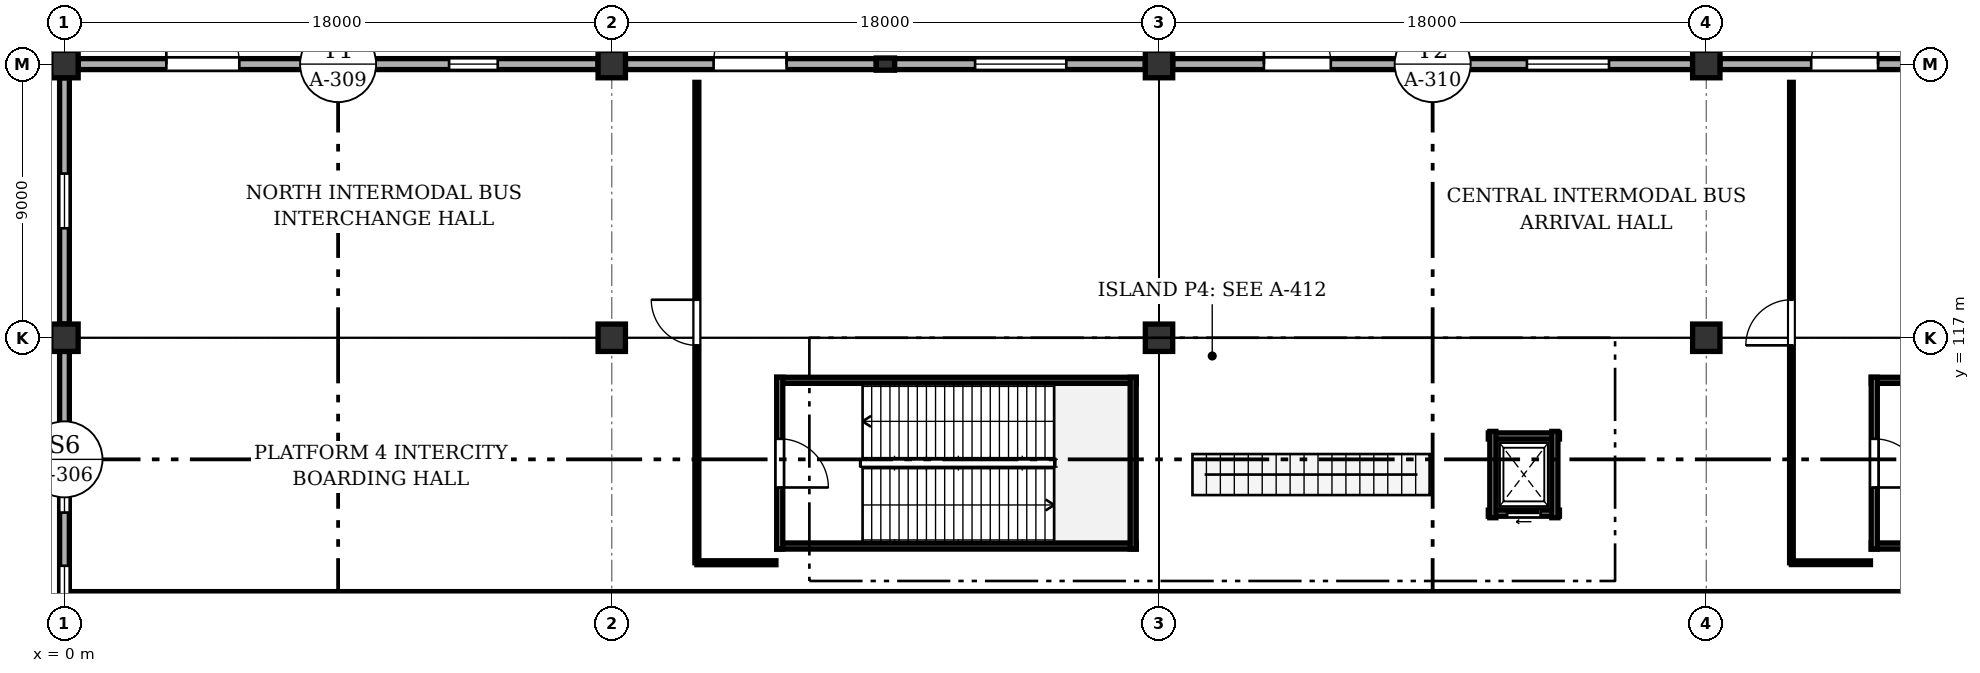
"""IFC4 building model, lengths in metres.
Left out: names, types, materials, properties, quantities, classifications, styles, units other than length and angle.
Written with IfcOpenShell. Run it as: python <this file> out.ifc"""

import sys

from ifc_helpers import new_model, si_unit, direction, frame, frame_2d, origin, origin_2d, place, context, subcontext, project, spatial, rectangle, i_section, extrude, element, fill, save


model = new_model("IFC4")
c1 = context("Model", 3, precision=1e-05, world=origin(), true_north=direction((0.0, 1.0)))
c2 = subcontext(c1, "Body", "Model", "MODEL_VIEW")
j1 = project(units=[si_unit("LENGTHUNIT", "METRE"), si_unit("PLANEANGLEUNIT", "RADIAN")], contexts=[c1])
p1 = place(None, origin())
s1 = spatial("IfcSite", under=j1, at=p1, CompositionType="ELEMENT")
p2 = place(p1, origin())
s2 = spatial("IfcBuilding", under=s1, at=p2, CompositionType="ELEMENT")
p3 = place(p2, origin())
s3 = spatial("IfcBuildingStorey", under=s2, at=p3, CompositionType="ELEMENT", Elevation=0.0)
for number, where, z_axis, x_axis in (
    (1, (0.0, 117.0, 0.0), (0.0, 0.0, 1.0), (1.0, 0.0, 0.0)),
    (2, (0.0, 126.0, 0.0), (0.0, 0.0, 1.0), (1.0, 0.0, 0.0)),
    (3, (18.0, 117.0, 0.0), (0.0, 0.0, 1.0), (1.0, 0.0, 0.0)),
    (4, (18.0, 126.0, 0.0), (0.0, 0.0, 1.0), (1.0, 0.0, 0.0)),
    (5, (36.0, 117.0, 0.0), (0.0, 0.0, 1.0), (1.0, 0.0, 0.0)),
    (6, (36.0, 126.0, 0.0), (0.0, 0.0, 1.0), (1.0, 0.0, 0.0)),
    (7, (54.0, 117.0, 0.0), (0.0, 0.0, 1.0), (1.0, 0.0, 0.0)),
    (8, (54.0, 126.0, 0.0), (0.0, 0.0, 1.0), (1.0, 0.0, 0.0)),
):
    element("IfcColumn", number, at=place(p3, frame(where, z_axis=z_axis, x_axis=x_axis)), inside=s3, PredefinedType="COLUMN", context=c2, shape_type="SweptSolid", body=[
        extrude(rectangle(XDim=0.9, YDim=0.9, at=origin_2d()), origin(), (0.0, 0.0, 1.0), 6.6),
    ])
p4 = place(p3, frame((9.0, 126.0, 0.0), z_axis=(0.0, 0.0, 1.0), x_axis=(1.0, 0.0, 0.0)))
e9 = element("IfcColumn", 9, at=p4, inside=s3, PredefinedType="PILASTER", context=c2, shape_type="SweptSolid", body=[
    extrude(i_section(OverallWidth=0.2, OverallDepth=0.2, WebThickness=0.008, FlangeThickness=0.012, FilletRadius=0.013, at=origin_2d()), origin(), (0.0, 0.0, 1.0), 6.28),
])
p5 = place(p3, frame((27.0, 126.0, 0.0), z_axis=(0.0, 0.0, 1.0), x_axis=(1.0, 0.0, 0.0)))
e10 = element("IfcColumn", 10, at=p5, inside=s3, PredefinedType="PILASTER", context=c2, shape_type="SweptSolid", body=[
    extrude(rectangle(XDim=0.6, YDim=0.4, at=origin_2d()), origin(), (0.0, 0.0, 1.0), 6.28),
])
p6 = place(p3, frame((45.0, 126.0, 0.0), z_axis=(0.0, 0.0, 1.0), x_axis=(1.0, 0.0, 0.0)))
e11 = element("IfcColumn", 11, at=p6, inside=s3, PredefinedType="PILASTER", context=c2, shape_type="SweptSolid", body=[
    extrude(i_section(OverallWidth=0.25, OverallDepth=0.25, WebThickness=0.009, FlangeThickness=0.014, FilletRadius=0.016, at=origin_2d()), origin(), (0.0, 0.0, 1.0), 6.28),
])
p7 = place(p3, frame((0.15, 108.5, -1.25), z_axis=(0.0, 0.0, 1.0), x_axis=(1.0, 0.0, 0.0)))
e12 = element("IfcWall", 12, at=p7, inside=s3, PredefinedType="SOLIDWALL", context=c2, shape_type="SweptSolid", body=[
    extrude(rectangle(XDim=107.7, YDim=0.3, at=frame_2d((53.85, 0.0))), origin(), (0.0, 0.0, 1.0), 0.87),
])
p8 = place(p3, frame((0.0, 104.1, 0.0), z_axis=(0.0, 0.0, 1.0), x_axis=(0.0, 1.0, 0.0)))
e13 = element("IfcWall", 13, at=p8, inside=s3, PredefinedType="SOLIDWALL", context=c2, shape_type="SweptSolid", body=[
    extrude(rectangle(XDim=12.45, YDim=0.32, at=frame_2d((6.225, 0.0))), origin(), (0.0, 0.0, 1.0), 5.495),
])
p9 = place(p8, frame((3.0, 0.0, 0.95)))
e14 = element("IfcOpeningElement", 14, at=p9, cuts=e13, PredefinedType="OPENING", context=c2, shape_type="SweptSolid", body=[
    extrude(rectangle(XDim=2.4, YDim=2.1, at=frame_2d((1.2, 1.05))), frame((0.0, 0.17, 0.0), z_axis=(0.0, -1.0, 0.0), x_axis=(1.0, 0.0, 0.0)), (0.0, 0.0, 1.0), 0.34),
])
p10 = place(p8, frame((7.15, 0.0, 0.95)))
e15 = element("IfcOpeningElement", 15, at=p10, cuts=e13, PredefinedType="OPENING", context=c2, shape_type="SweptSolid", body=[
    extrude(rectangle(XDim=2.1, YDim=2.0, at=frame_2d((1.05, 1.0))), frame((0.0, 0.17, 0.0), z_axis=(0.0, -1.0, 0.0), x_axis=(1.0, 0.0, 0.0)), (0.0, 0.0, 1.0), 0.34),
])
p11 = place(p3, frame((0.0, 117.45, 0.0), z_axis=(0.0, 0.0, 1.0), x_axis=(0.0, 1.0, 0.0)))
e16 = element("IfcWall", 16, at=p11, inside=s3, PredefinedType="SOLIDWALL", context=c2, shape_type="SweptSolid", body=[
    extrude(rectangle(XDim=8.1, YDim=0.32, at=frame_2d((4.05, 0.0))), origin(), (0.0, 0.0, 1.0), 5.67),
])
p12 = place(p11, frame((3.15, 0.0, 0.95)))
e17 = element("IfcOpeningElement", 17, at=p12, cuts=e16, PredefinedType="OPENING", context=c2, shape_type="SweptSolid", body=[
    extrude(rectangle(XDim=1.8, YDim=2.0, at=frame_2d((0.9, 1.0))), frame((0.0, 0.17, 0.0), z_axis=(0.0, -1.0, 0.0), x_axis=(1.0, 0.0, 0.0)), (0.0, 0.0, 1.0), 0.34),
])
p13 = place(p3, frame((0.45, 126.0, 0.0), z_axis=(0.0, 0.0, 1.0), x_axis=(1.0, 0.0, 0.0)))
e18 = element("IfcWall", 18, at=p13, inside=s3, PredefinedType="SOLIDWALL", context=c2, shape_type="SweptSolid", body=[
    extrude(rectangle(XDim=8.546, YDim=0.36, at=frame_2d((4.273, 0.0))), origin(), (0.0, 0.0, 1.0), 5.79),
])
p14 = place(p13, frame((2.9, 0.0, 0.0)))
e19 = element("IfcOpeningElement", 19, at=p14, cuts=e18, PredefinedType="OPENING", context=c2, shape_type="SweptSolid", body=[
    extrude(rectangle(XDim=2.4, YDim=2.5, at=frame_2d((1.2, 1.25))), frame((0.0, 0.19, 0.0), z_axis=(0.0, -1.0, 0.0), x_axis=(1.0, 0.0, 0.0)), (0.0, 0.0, 1.0), 0.38),
])
p15 = place(p3, frame((9.004, 126.0, 0.0), z_axis=(0.0, 0.0, 1.0), x_axis=(1.0, 0.0, 0.0)))
e20 = element("IfcWall", 20, at=p15, inside=s3, PredefinedType="SOLIDWALL", context=c2, shape_type="SweptSolid", body=[
    extrude(rectangle(XDim=8.546, YDim=0.36, at=frame_2d((4.273, 0.0))), origin(), (0.0, 0.0, 1.0), 5.79),
])
p16 = place(p15, frame((3.646, 0.0, 0.95)))
e21 = element("IfcOpeningElement", 21, at=p16, cuts=e20, PredefinedType="OPENING", context=c2, shape_type="SweptSolid", body=[
    extrude(rectangle(XDim=1.6, YDim=1.9, at=frame_2d((0.8, 0.95))), frame((0.0, 0.19, 0.0), z_axis=(0.0, -1.0, 0.0), x_axis=(1.0, 0.0, 0.0)), (0.0, 0.0, 1.0), 0.38),
])
p17 = place(p3, frame((18.45, 126.0, 0.0), z_axis=(0.0, 0.0, 1.0), x_axis=(1.0, 0.0, 0.0)))
e22 = element("IfcWall", 22, at=p17, inside=s3, PredefinedType="SOLIDWALL", context=c2, shape_type="SweptSolid", body=[
    extrude(rectangle(XDim=8.25, YDim=0.36, at=frame_2d((4.125, 0.0))), origin(), (0.0, 0.0, 1.0), 5.79),
])
p18 = place(p17, frame((2.9, 0.0, 0.0)))
e23 = element("IfcOpeningElement", 23, at=p18, cuts=e22, PredefinedType="OPENING", context=c2, shape_type="SweptSolid", body=[
    extrude(rectangle(XDim=2.4, YDim=2.5, at=frame_2d((1.2, 1.25))), frame((0.0, 0.19, 0.0), z_axis=(0.0, -1.0, 0.0), x_axis=(1.0, 0.0, 0.0)), (0.0, 0.0, 1.0), 0.38),
])
p19 = place(p3, frame((27.3, 126.0, 0.0), z_axis=(0.0, 0.0, 1.0), x_axis=(1.0, 0.0, 0.0)))
e24 = element("IfcWall", 24, at=p19, inside=s3, PredefinedType="SOLIDWALL", context=c2, shape_type="SweptSolid", body=[
    extrude(rectangle(XDim=8.25, YDim=0.36, at=frame_2d((4.125, 0.0))), origin(), (0.0, 0.0, 1.0), 5.79),
])
p20 = place(p19, frame((2.65, 0.0, 0.95)))
e25 = element("IfcOpeningElement", 25, at=p20, cuts=e24, PredefinedType="OPENING", context=c2, shape_type="SweptSolid", body=[
    extrude(rectangle(XDim=3.0, YDim=2.1, at=frame_2d((1.5, 1.05))), frame((0.0, 0.19, 0.0), z_axis=(0.0, -1.0, 0.0), x_axis=(1.0, 0.0, 0.0)), (0.0, 0.0, 1.0), 0.38),
])
p21 = place(p3, frame((36.45, 126.0, 0.0), z_axis=(0.0, 0.0, 1.0), x_axis=(1.0, 0.0, 0.0)))
e26 = element("IfcWall", 26, at=p21, inside=s3, PredefinedType="SOLIDWALL", context=c2, shape_type="SweptSolid", body=[
    extrude(rectangle(XDim=8.546, YDim=0.36, at=frame_2d((4.273, 0.0))), origin(), (0.0, 0.0, 1.0), 5.79),
])
p22 = place(p21, frame((3.0, 0.0, 0.0)))
e27 = element("IfcOpeningElement", 27, at=p22, cuts=e26, PredefinedType="OPENING", context=c2, shape_type="SweptSolid", body=[
    extrude(rectangle(XDim=2.2, YDim=2.45, at=frame_2d((1.1, 1.225))), frame((0.0, 0.19, 0.0), z_axis=(0.0, -1.0, 0.0), x_axis=(1.0, 0.0, 0.0)), (0.0, 0.0, 1.0), 0.38),
])
p23 = place(p3, frame((45.004, 126.0, 0.0), z_axis=(0.0, 0.0, 1.0), x_axis=(1.0, 0.0, 0.0)))
e28 = element("IfcWall", 28, at=p23, inside=s3, PredefinedType="SOLIDWALL", context=c2, shape_type="SweptSolid", body=[
    extrude(rectangle(XDim=8.546, YDim=0.36, at=frame_2d((4.273, 0.0))), origin(), (0.0, 0.0, 1.0), 5.79),
])
p24 = place(p23, frame((3.095, 0.0, 0.95)))
e29 = element("IfcOpeningElement", 29, at=p24, cuts=e28, PredefinedType="OPENING", context=c2, shape_type="SweptSolid", body=[
    extrude(rectangle(XDim=2.7, YDim=2.1, at=frame_2d((1.35, 1.05))), frame((0.0, 0.19, 0.0), z_axis=(0.0, -1.0, 0.0), x_axis=(1.0, 0.0, 0.0)), (0.0, 0.0, 1.0), 0.38),
])
p25 = place(p3, frame((54.45, 126.0, 0.0), z_axis=(0.0, 0.0, 1.0), x_axis=(1.0, 0.0, 0.0)))
e30 = element("IfcWall", 30, at=p25, inside=s3, PredefinedType="SOLIDWALL", context=c2, shape_type="SweptSolid", body=[
    extrude(rectangle(XDim=8.25, YDim=0.36, at=frame_2d((4.125, 0.0))), origin(), (0.0, 0.0, 1.0), 5.79),
])
p26 = place(p25, frame((3.0, 0.0, 0.0)))
e31 = element("IfcOpeningElement", 31, at=p26, cuts=e30, PredefinedType="OPENING", context=c2, shape_type="SweptSolid", body=[
    extrude(rectangle(XDim=2.2, YDim=2.45, at=frame_2d((1.1, 1.225))), frame((0.0, 0.19, 0.0), z_axis=(0.0, -1.0, 0.0), x_axis=(1.0, 0.0, 0.0)), (0.0, 0.0, 1.0), 0.38),
])
for number, where, z_axis, x_axis in (
    (32, (23.425, 110.15, 0.0), (0.0, 0.0, 1.0), (1.0, 0.0, 0.0)),
    (33, (35.25, 115.6, 0.0), (0.0, 0.0, 1.0), (-1.0, 0.0, 0.0)),
):
    element("IfcWall", number, at=place(p3, frame(where, z_axis=z_axis, x_axis=x_axis)), inside=s3, PredefinedType="SOLIDWALL", context=c2, shape_type="SweptSolid", body=[
        extrude(rectangle(XDim=11.825, YDim=0.2, at=frame_2d((5.913, 0.0))), origin(), (0.0, 0.0, 1.0), 6.32),
    ])
p27 = place(p3, frame((35.15, 110.05, 0.0), z_axis=(0.0, 0.0, 1.0), x_axis=(0.0, 1.0, 0.0)))
e34 = element("IfcWall", 34, at=p27, inside=s3, PredefinedType="SOLIDWALL", context=c2, shape_type="SweptSolid", body=[
    extrude(rectangle(XDim=5.65, YDim=0.2, at=frame_2d((2.825, 0.0))), origin(), (0.0, 0.0, 1.0), 6.32),
])
p28 = place(p3, frame((23.525, 115.7, 0.0), z_axis=(0.0, 0.0, 1.0), x_axis=(0.0, -1.0, 0.0)))
e35 = element("IfcWall", 35, at=p28, inside=s3, PredefinedType="SOLIDWALL", context=c2, shape_type="SweptSolid", body=[
    extrude(rectangle(XDim=5.65, YDim=0.2, at=frame_2d((2.825, 0.0))), origin(), (0.0, 0.0, 1.0), 4.4),
])
p29 = place(p28, frame((2.025, 0.0, 0.0)))
e36 = element("IfcOpeningElement", 36, at=p29, cuts=e35, PredefinedType="OPENING", context=c2, shape_type="SweptSolid", body=[
    extrude(rectangle(XDim=1.6, YDim=2.15, at=frame_2d((0.8, 1.075))), frame((0.0, 0.11, 0.0), z_axis=(0.0, -1.0, 0.0), x_axis=(1.0, 0.0, 0.0)), (0.0, 0.0, 1.0), 0.22),
])
for number, where, z_axis, x_axis in (
    (37, (59.425, 110.15, 0.0), (0.0, 0.0, 1.0), (1.0, 0.0, 0.0)),
    (38, (71.25, 115.6, 0.0), (0.0, 0.0, 1.0), (-1.0, 0.0, 0.0)),
):
    element("IfcWall", number, at=place(p3, frame(where, z_axis=z_axis, x_axis=x_axis)), inside=s3, PredefinedType="SOLIDWALL", context=c2, shape_type="SweptSolid", body=[
        extrude(rectangle(XDim=11.825, YDim=0.2, at=frame_2d((5.913, 0.0))), origin(), (0.0, 0.0, 1.0), 6.32),
    ])
p30 = place(p3, frame((59.525, 115.7, 0.0), z_axis=(0.0, 0.0, 1.0), x_axis=(0.0, -1.0, 0.0)))
e39 = element("IfcWall", 39, at=p30, inside=s3, PredefinedType="SOLIDWALL", context=c2, shape_type="SweptSolid", body=[
    extrude(rectangle(XDim=5.65, YDim=0.2, at=frame_2d((2.825, 0.0))), origin(), (0.0, 0.0, 1.0), 4.4),
])
p31 = place(p30, frame((2.025, 0.0, 0.0)))
e40 = element("IfcOpeningElement", 40, at=p31, cuts=e39, PredefinedType="OPENING", context=c2, shape_type="SweptSolid", body=[
    extrude(rectangle(XDim=1.6, YDim=2.15, at=frame_2d((0.8, 1.075))), frame((0.0, 0.11, 0.0), z_axis=(0.0, -1.0, 0.0), x_axis=(1.0, 0.0, 0.0)), (0.0, 0.0, 1.0), 0.22),
])
p32 = place(p3, frame((46.83, 111.23, 0.0), z_axis=(0.0, 0.0, 1.0), x_axis=(1.0, 0.0, 0.0)))
e41 = element("IfcWall", 41, at=p32, inside=s3, PredefinedType="SOLIDWALL", context=c2, shape_type="SweptSolid", body=[
    extrude(rectangle(XDim=2.34, YDim=0.2, at=frame_2d((1.17, 0.0))), origin(), (0.0, 0.0, 1.0), 4.4),
])
p33 = place(p32, frame((0.62, 0.0, 0.0)))
e42 = element("IfcOpeningElement", 42, at=p33, cuts=e41, PredefinedType="OPENING", context=c2, shape_type="SweptSolid", body=[
    extrude(rectangle(XDim=1.1, YDim=2.15, at=frame_2d((0.55, 1.075))), frame((0.0, 0.11, 0.0), z_axis=(0.0, -1.0, 0.0), x_axis=(1.0, 0.0, 0.0)), (0.0, 0.0, 1.0), 0.22),
])
p34 = place(p3, frame((49.17, 113.77, 0.0), z_axis=(0.0, 0.0, 1.0), x_axis=(-1.0, 0.0, 0.0)))
e43 = element("IfcWall", 43, at=p34, inside=s3, PredefinedType="SOLIDWALL", context=c2, shape_type="SweptSolid", body=[
    extrude(rectangle(XDim=2.34, YDim=0.2, at=frame_2d((1.17, 0.0))), origin(), (0.0, 0.0, 1.0), 4.4),
])
for number, where, z_axis, x_axis in (
    (44, (46.98, 113.92, 0.0), (0.0, 0.0, 1.0), (0.0, -1.0, 0.0)),
    (45, (49.02, 111.08, 0.0), (0.0, 0.0, 1.0), (0.0, 1.0, 0.0)),
):
    element("IfcWall", number, at=place(p3, frame(where, z_axis=z_axis, x_axis=x_axis)), inside=s3, PredefinedType="SOLIDWALL", context=c2, shape_type="SweptSolid", body=[
        extrude(rectangle(XDim=2.84, YDim=0.2, at=frame_2d((1.42, 0.0))), origin(), (0.0, 0.0, 1.0), 4.4),
    ])
p35 = place(p3, frame((23.4, 109.6, 0.0), z_axis=(0.0, 0.0, 1.0), x_axis=(-1.0, 0.0, 0.0)))
e46 = element("IfcWall", 46, at=p35, inside=s3, PredefinedType="PARTITIONING", context=c2, shape_type="SweptSolid", body=[
    extrude(rectangle(XDim=2.6, YDim=0.13, at=frame_2d((1.3, 0.0))), origin(), (0.0, 0.0, 1.0), 4.4),
])
p36 = place(p3, frame((20.8, 109.6, 0.0), z_axis=(0.0, 0.0, 1.0), x_axis=(0.0, 1.0, 0.0)))
e47 = element("IfcWall", 47, at=p36, inside=s3, PredefinedType="PARTITIONING", context=c2, shape_type="SweptSolid", body=[
    extrude(rectangle(XDim=15.8, YDim=0.13, at=frame_2d((7.9, 0.0))), origin(), (0.0, 0.0, 1.0), 4.4),
])
p37 = place(p36, frame((7.15, 0.0, 0.0)))
e48 = element("IfcOpeningElement", 48, at=p37, cuts=e47, PredefinedType="OPENING", context=c2, shape_type="SweptSolid", body=[
    extrude(rectangle(XDim=1.5, YDim=2.15, at=frame_2d((0.75, 1.075))), frame((0.0, 0.075, 0.0), z_axis=(0.0, -1.0, 0.0), x_axis=(1.0, 0.0, 0.0)), (0.0, 0.0, 1.0), 0.15),
])
p38 = place(p3, frame((59.4, 109.6, 0.0), z_axis=(0.0, 0.0, 1.0), x_axis=(-1.0, 0.0, 0.0)))
e49 = element("IfcWall", 49, at=p38, inside=s3, PredefinedType="PARTITIONING", context=c2, shape_type="SweptSolid", body=[
    extrude(rectangle(XDim=2.6, YDim=0.12, at=frame_2d((1.3, 0.0))), origin(), (0.0, 0.0, 1.0), 4.4),
])
p39 = place(p3, frame((56.8, 109.6, 0.0), z_axis=(0.0, 0.0, 1.0), x_axis=(0.0, 1.0, 0.0)))
e50 = element("IfcWall", 50, at=p39, inside=s3, PredefinedType="PARTITIONING", context=c2, shape_type="SweptSolid", body=[
    extrude(rectangle(XDim=15.8, YDim=0.12, at=frame_2d((7.9, 0.0))), origin(), (0.0, 0.0, 1.0), 4.4),
])
p40 = place(p39, frame((7.15, 0.0, 0.0)))
e51 = element("IfcOpeningElement", 51, at=p40, cuts=e50, PredefinedType="OPENING", context=c2, shape_type="SweptSolid", body=[
    extrude(rectangle(XDim=1.5, YDim=2.15, at=frame_2d((0.75, 1.075))), frame((0.0, 0.07, 0.0), z_axis=(0.0, -1.0, 0.0), x_axis=(1.0, 0.0, 0.0)), (0.0, 0.0, 1.0), 0.14),
])
p41 = place(p9, origin())
e52 = element("IfcWindow", 52, at=p41, inside=s3, PartitioningType="SINGLE_PANEL", PredefinedType="WINDOW", context=c2, shape_type="SweptSolid", body=[
    extrude(rectangle(XDim=2.4, YDim=2.1, at=frame_2d((1.2, 1.05))), frame((0.0, 0.03, 0.0), z_axis=(0.0, -1.0, 0.0), x_axis=(1.0, 0.0, 0.0)), (0.0, 0.0, 1.0), 0.06),
])
fill(e14, e52)
p42 = place(p10, origin())
e53 = element("IfcWindow", 53, at=p42, inside=s3, PartitioningType="SINGLE_PANEL", PredefinedType="WINDOW", context=c2, shape_type="SweptSolid", body=[
    extrude(rectangle(XDim=2.1, YDim=2.0, at=frame_2d((1.05, 1.0))), frame((0.0, 0.03, 0.0), z_axis=(0.0, -1.0, 0.0), x_axis=(1.0, 0.0, 0.0)), (0.0, 0.0, 1.0), 0.06),
])
fill(e15, e53)
p43 = place(p12, origin())
e54 = element("IfcWindow", 54, at=p43, inside=s3, PartitioningType="SINGLE_PANEL", PredefinedType="WINDOW", context=c2, shape_type="SweptSolid", body=[
    extrude(rectangle(XDim=1.8, YDim=2.0, at=frame_2d((0.9, 1.0))), frame((0.0, 0.03, 0.0), z_axis=(0.0, -1.0, 0.0), x_axis=(1.0, 0.0, 0.0)), (0.0, 0.0, 1.0), 0.06),
])
fill(e17, e54)
p44 = place(p14, origin())
e55 = element("IfcDoor", 55, at=p44, inside=s3, OperationType="SINGLE_SWING_LEFT", PredefinedType="DOOR", context=c2, shape_type="SweptSolid", body=[
    extrude(rectangle(XDim=2.4, YDim=2.5, at=frame_2d((1.2, 1.25))), frame((0.0, 0.025, 0.0), z_axis=(0.0, -1.0, 0.0), x_axis=(1.0, 0.0, 0.0)), (0.0, 0.0, 1.0), 0.05),
])
fill(e19, e55)
p45 = place(p16, origin())
e56 = element("IfcWindow", 56, at=p45, inside=s3, PartitioningType="SINGLE_PANEL", PredefinedType="WINDOW", context=c2, shape_type="SweptSolid", body=[
    extrude(rectangle(XDim=1.6, YDim=1.9, at=frame_2d((0.8, 0.95))), frame((0.0, 0.03, 0.0), z_axis=(0.0, -1.0, 0.0), x_axis=(1.0, 0.0, 0.0)), (0.0, 0.0, 1.0), 0.06),
])
fill(e21, e56)
p46 = place(p18, origin())
e57 = element("IfcDoor", 57, at=p46, inside=s3, OperationType="SINGLE_SWING_RIGHT", PredefinedType="DOOR", context=c2, shape_type="SweptSolid", body=[
    extrude(rectangle(XDim=2.4, YDim=2.5, at=frame_2d((1.2, 1.25))), frame((0.0, 0.025, 0.0), z_axis=(0.0, -1.0, 0.0), x_axis=(1.0, 0.0, 0.0)), (0.0, 0.0, 1.0), 0.05),
])
fill(e23, e57)
p47 = place(p20, origin())
e58 = element("IfcWindow", 58, at=p47, inside=s3, PartitioningType="SINGLE_PANEL", PredefinedType="WINDOW", context=c2, shape_type="SweptSolid", body=[
    extrude(rectangle(XDim=3.0, YDim=2.1, at=frame_2d((1.5, 1.05))), frame((0.0, 0.03, 0.0), z_axis=(0.0, -1.0, 0.0), x_axis=(1.0, 0.0, 0.0)), (0.0, 0.0, 1.0), 0.06),
])
fill(e25, e58)
p48 = place(p22, origin())
e59 = element("IfcDoor", 59, at=p48, inside=s3, OperationType="SINGLE_SWING_LEFT", PredefinedType="DOOR", context=c2, shape_type="SweptSolid", body=[
    extrude(rectangle(XDim=2.2, YDim=2.45, at=frame_2d((1.1, 1.225))), frame((0.0, 0.025, 0.0), z_axis=(0.0, -1.0, 0.0), x_axis=(1.0, 0.0, 0.0)), (0.0, 0.0, 1.0), 0.05),
])
fill(e27, e59)
p49 = place(p24, origin())
e60 = element("IfcWindow", 60, at=p49, inside=s3, PartitioningType="SINGLE_PANEL", PredefinedType="WINDOW", context=c2, shape_type="SweptSolid", body=[
    extrude(rectangle(XDim=2.7, YDim=2.1, at=frame_2d((1.35, 1.05))), frame((0.0, 0.03, 0.0), z_axis=(0.0, -1.0, 0.0), x_axis=(1.0, 0.0, 0.0)), (0.0, 0.0, 1.0), 0.06),
])
fill(e29, e60)
p50 = place(p26, origin())
e61 = element("IfcDoor", 61, at=p50, inside=s3, OperationType="SINGLE_SWING_RIGHT", PredefinedType="DOOR", context=c2, shape_type="SweptSolid", body=[
    extrude(rectangle(XDim=2.2, YDim=2.45, at=frame_2d((1.1, 1.225))), frame((0.0, 0.025, 0.0), z_axis=(0.0, -1.0, 0.0), x_axis=(1.0, 0.0, 0.0)), (0.0, 0.0, 1.0), 0.05),
])
fill(e31, e61)
p51 = place(p29, origin())
e62 = element("IfcDoor", 62, at=p51, inside=s3, OperationType="SINGLE_SWING_RIGHT", PredefinedType="DOOR", context=c2, shape_type="SweptSolid", body=[
    extrude(rectangle(XDim=1.6, YDim=2.15, at=frame_2d((0.8, 1.075))), frame((0.0, 0.025, 0.0), z_axis=(0.0, -1.0, 0.0), x_axis=(1.0, 0.0, 0.0)), (0.0, 0.0, 1.0), 0.05),
])
fill(e36, e62)
p52 = place(p31, origin())
e63 = element("IfcDoor", 63, at=p52, inside=s3, OperationType="SINGLE_SWING_RIGHT", PredefinedType="DOOR", context=c2, shape_type="SweptSolid", body=[
    extrude(rectangle(XDim=1.6, YDim=2.15, at=frame_2d((0.8, 1.075))), frame((0.0, 0.025, 0.0), z_axis=(0.0, -1.0, 0.0), x_axis=(1.0, 0.0, 0.0)), (0.0, 0.0, 1.0), 0.05),
])
fill(e40, e63)
p53 = place(p33, origin())
e64 = element("IfcDoor", 64, at=p53, inside=s3, OperationType="SLIDING_TO_LEFT", PredefinedType="DOOR", context=c2, shape_type="SweptSolid", body=[
    extrude(rectangle(XDim=1.1, YDim=2.15, at=frame_2d((0.55, 1.075))), frame((0.0, 0.025, 0.0), z_axis=(0.0, -1.0, 0.0), x_axis=(1.0, 0.0, 0.0)), (0.0, 0.0, 1.0), 0.05),
])
fill(e42, e64)
p54 = place(p37, origin())
e65 = element("IfcDoor", 65, at=p54, inside=s3, OperationType="SINGLE_SWING_RIGHT", PredefinedType="DOOR", context=c2, shape_type="SweptSolid", body=[
    extrude(rectangle(XDim=1.5, YDim=2.15, at=frame_2d((0.75, 1.075))), frame((0.0, 0.025, 0.0), z_axis=(0.0, -1.0, 0.0), x_axis=(1.0, 0.0, 0.0)), (0.0, 0.0, 1.0), 0.05),
])
fill(e48, e65)
p55 = place(p40, origin())
e66 = element("IfcDoor", 66, at=p55, inside=s3, OperationType="SINGLE_SWING_LEFT", PredefinedType="DOOR", context=c2, shape_type="SweptSolid", body=[
    extrude(rectangle(XDim=1.5, YDim=2.15, at=frame_2d((0.75, 1.075))), frame((0.0, 0.025, 0.0), z_axis=(0.0, -1.0, 0.0), x_axis=(1.0, 0.0, 0.0)), (0.0, 0.0, 1.0), 0.05),
])
fill(e51, e66)
save(model, sys.argv[1])
